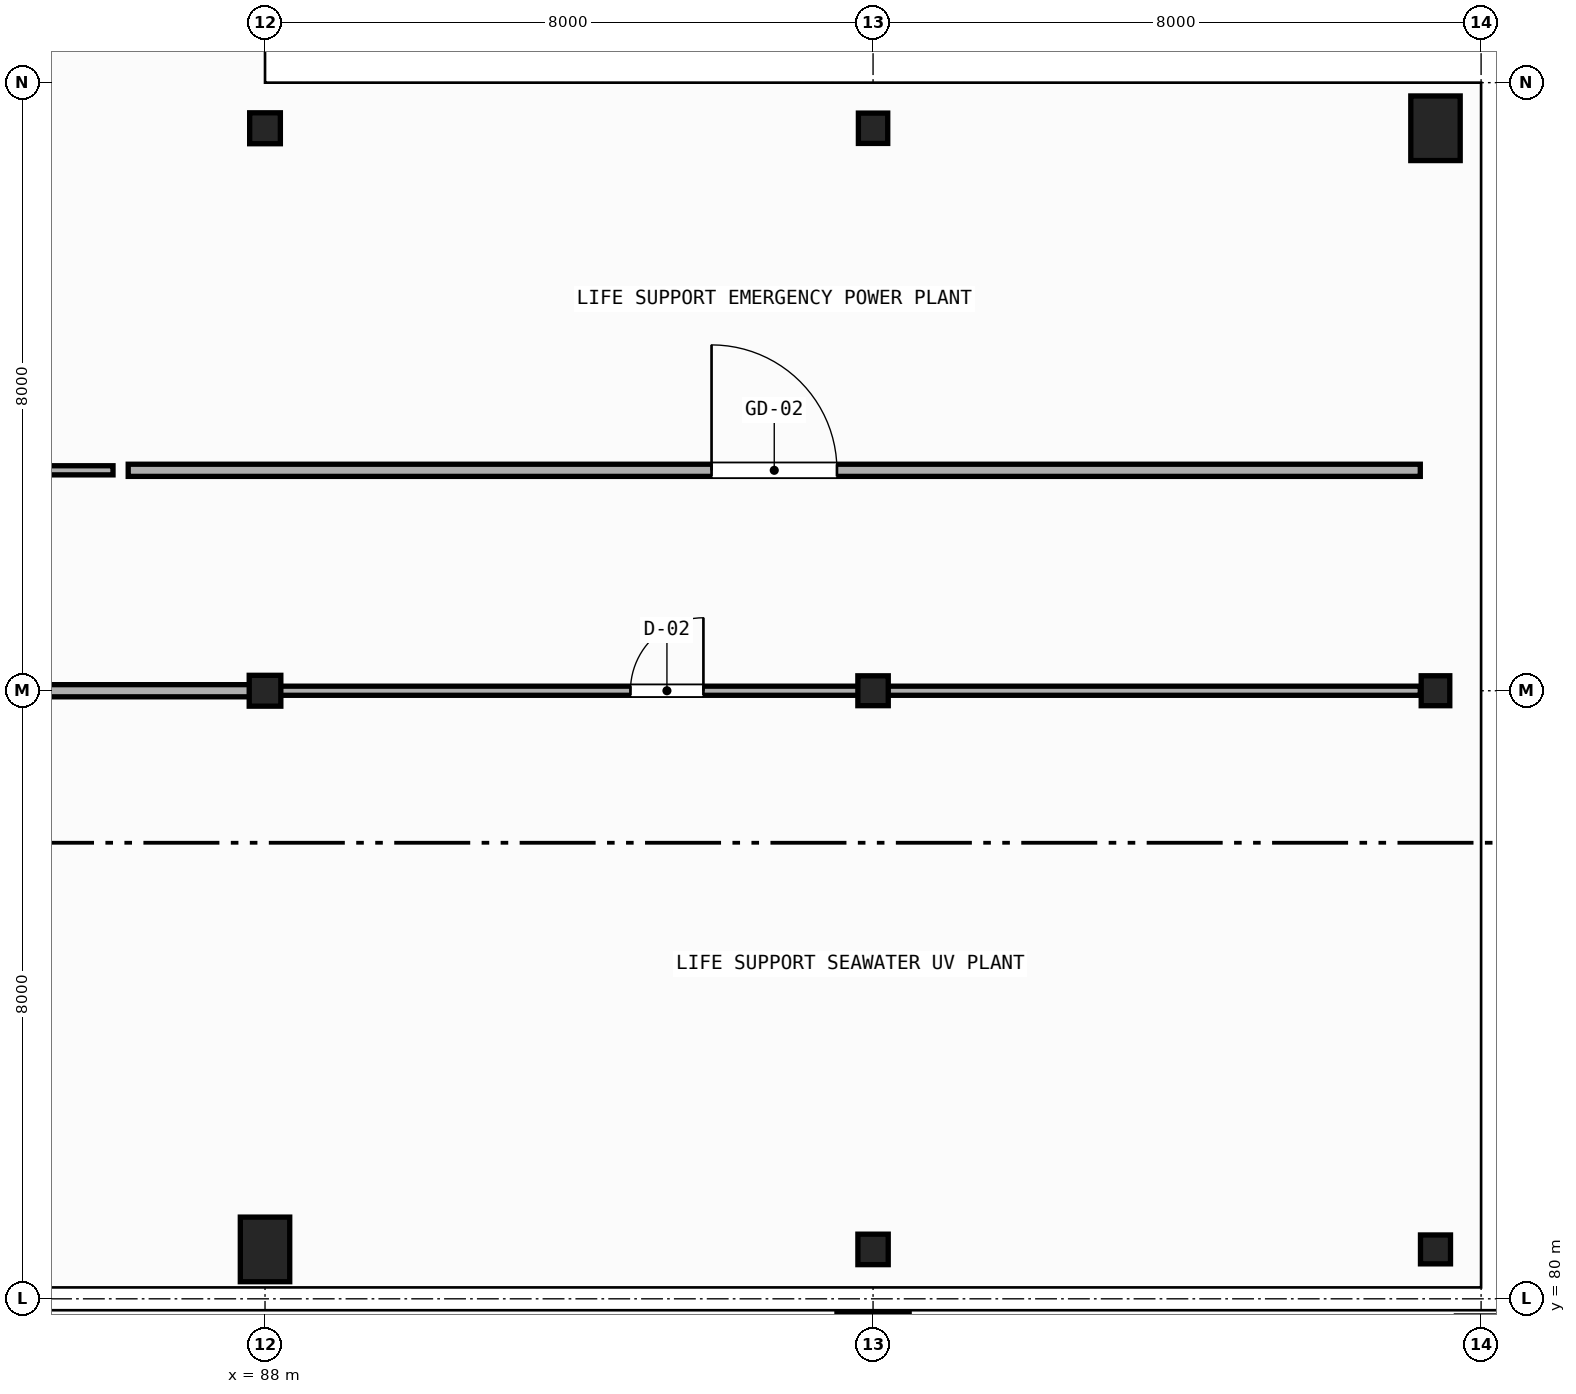
"""IFC4 building model, lengths in metres.
Left out: names, types, materials, properties, quantities, classifications, styles, units other than length and angle.
Written with IfcOpenShell. Run it as: python <this file> out.ifc"""

import sys

from ifc_helpers import new_model, si_unit, direction, frame, frame_2d, origin, origin_2d, place, context, subcontext, project, spatial, rectangle, i_section, extrude, element, fill, save


model = new_model("IFC4")
c1 = context("Model", 3, precision=1e-05, world=origin(), true_north=direction((0.0, 1.0)))
c2 = subcontext(c1, "Body", "Model", "MODEL_VIEW")
j1 = project(units=[si_unit("LENGTHUNIT", "METRE"), si_unit("PLANEANGLEUNIT", "RADIAN")], contexts=[c1])
p1 = place(None, origin())
s1 = spatial("IfcSite", under=j1, at=p1, CompositionType="ELEMENT")
p2 = place(p1, origin())
s2 = spatial("IfcBuilding", under=s1, at=p2, CompositionType="ELEMENT")
p3 = place(p2, origin())
s3 = spatial("IfcBuildingStorey", under=s2, at=p3, CompositionType="ELEMENT", Elevation=0.0)
p4 = place(p3, frame((96.0, 79.35, 0.0), z_axis=(0.0, 0.0, 1.0), x_axis=(0.0, 1.0, 0.0)))
e1 = element("IfcColumn", 1, at=p4, inside=s3, PredefinedType="COLUMN", context=c2, shape_type="SweptSolid", body=[
    extrude(rectangle(XDim=0.95, YDim=0.95, at=origin_2d()), origin(), (0.0, 0.0, 1.0), 5.08),
])
p5 = place(p3, frame((88.0, 80.65, 0.0), z_axis=(0.0, 0.0, 1.0), x_axis=(1.0, 0.0, 0.0)))
e2 = element("IfcColumn", 2, at=p5, inside=s3, PredefinedType="PILASTER", context=c2, shape_type="SweptSolid", body=[
    extrude(rectangle(XDim=0.65, YDim=0.85, at=origin_2d()), origin(), (0.0, 0.0, 1.0), 5.08),
])
p6 = place(p3, frame((88.0, 88.0, 0.0), z_axis=(0.0, 0.0, 1.0), x_axis=(0.0, 1.0, 0.0)))
e3 = element("IfcColumn", 3, at=p6, inside=s3, PredefinedType="COLUMN", context=c2, shape_type="SweptSolid", body=[
    extrude(i_section(OverallWidth=0.406, OverallDepth=0.416, WebThickness=0.03, FlangeThickness=0.048, FilletRadius=0.015, at=origin_2d()), origin(), (0.0, 0.0, 1.0), 5.08),
])
p7 = place(p3, frame((88.0, 95.4, 0.0), z_axis=(0.0, 0.0, 1.0), x_axis=(1.0, 0.0, 0.0)))
e4 = element("IfcColumn", 4, at=p7, inside=s3, PredefinedType="COLUMN", context=c2, shape_type="SweptSolid", body=[
    extrude(i_section(OverallWidth=0.404, OverallDepth=0.407, WebThickness=0.027, FlangeThickness=0.044, FilletRadius=0.015, at=origin_2d()), origin(), (0.0, 0.0, 1.0), 5.08),
])
p8 = place(p3, frame((96.0, 80.65, 0.0), z_axis=(0.0, 0.0, 1.0), x_axis=(0.0, 1.0, 0.0)))
e5 = element("IfcColumn", 5, at=p8, inside=s3, PredefinedType="COLUMN", context=c2, shape_type="SweptSolid", body=[
    extrude(i_section(OverallWidth=0.401, OverallDepth=0.399, WebThickness=0.025, FlangeThickness=0.04, FilletRadius=0.015, at=origin_2d()), origin(), (0.0, 0.0, 1.0), 5.08),
])
p9 = place(p3, frame((96.0, 88.0, 0.0), z_axis=(0.0, 0.0, 1.0), x_axis=(1.0, 0.0, 0.0)))
e6 = element("IfcColumn", 6, at=p9, inside=s3, PredefinedType="COLUMN", context=c2, shape_type="SweptSolid", body=[
    extrude(i_section(OverallWidth=0.4, OverallDepth=0.393, WebThickness=0.023, FlangeThickness=0.037, FilletRadius=0.015, at=origin_2d()), origin(), (0.0, 0.0, 1.0), 5.08),
])
p10 = place(p3, frame((96.0, 95.4, 0.0), z_axis=(0.0, 0.0, 1.0), x_axis=(0.0, 1.0, 0.0)))
e7 = element("IfcColumn", 7, at=p10, inside=s3, PredefinedType="COLUMN", context=c2, shape_type="SweptSolid", body=[
    extrude(i_section(OverallWidth=0.399, OverallDepth=0.386, WebThickness=0.021, FlangeThickness=0.033, FilletRadius=0.015, at=origin_2d()), origin(), (0.0, 0.0, 1.0), 5.08),
])
p11 = place(p3, frame((103.4, 80.65, 0.0), z_axis=(0.0, 0.0, 1.0), x_axis=(1.0, 0.0, 0.0)))
e8 = element("IfcColumn", 8, at=p11, inside=s3, PredefinedType="COLUMN", context=c2, shape_type="SweptSolid", body=[
    extrude(i_section(OverallWidth=0.395, OverallDepth=0.38, WebThickness=0.019, FlangeThickness=0.03, FilletRadius=0.015, at=origin_2d()), origin(), (0.0, 0.0, 1.0), 5.08),
])
p12 = place(p3, frame((103.4, 88.0, 0.0), z_axis=(0.0, 0.0, 1.0), x_axis=(0.0, 1.0, 0.0)))
e9 = element("IfcColumn", 9, at=p12, inside=s3, PredefinedType="COLUMN", context=c2, shape_type="SweptSolid", body=[
    extrude(i_section(OverallWidth=0.394, OverallDepth=0.376, WebThickness=0.017, FlangeThickness=0.028, FilletRadius=0.015, at=origin_2d()), origin(), (0.0, 0.0, 1.0), 5.08),
])
p13 = place(p3, frame((103.4, 95.4, 0.0), z_axis=(0.0, 0.0, 1.0), x_axis=(1.0, 0.0, 0.0)))
e10 = element("IfcColumn", 10, at=p13, inside=s3, PredefinedType="PILASTER", context=c2, shape_type="SweptSolid", body=[
    extrude(rectangle(XDim=0.65, YDim=0.85, at=origin_2d()), origin(), (0.0, 0.0, 1.0), 5.08),
])
p14 = place(p3, frame((70.4, 88.0, 0.0), z_axis=(0.0, 0.0, 1.0), x_axis=(1.0, 0.0, 0.0)))
e11 = element("IfcWall", 11, at=p14, inside=s3, PredefinedType="PARTITIONING", context=c2, shape_type="SweptSolid", body=[
    extrude(rectangle(XDim=17.6, YDim=0.16, at=frame_2d((8.8, 0.0))), origin(), (0.0, 0.0, 1.0), 4.278),
])
p15 = place(p14, frame((5.421, 0.0, 0.0)))
e12 = element("IfcOpeningElement", 12, at=p15, cuts=e11, PredefinedType="OPENING", context=c2, shape_type="SweptSolid", body=[
    extrude(rectangle(XDim=1.02, YDim=2.15, at=frame_2d((0.51, 1.075))), frame((0.0, 0.09, 0.0), z_axis=(0.0, -1.0, 0.0), x_axis=(1.0, 0.0, 0.0)), (0.0, 0.0, 1.0), 0.18),
])
p16 = place(p3, frame((88.2, 88.0, 0.0), z_axis=(0.0, 0.0, 1.0), x_axis=(1.0, 0.0, 0.0)))
e13 = element("IfcWall", 13, at=p16, inside=s3, PredefinedType="PARTITIONING", context=c2, shape_type="SweptSolid", body=[
    extrude(rectangle(XDim=15.0, YDim=0.12, at=frame_2d((7.5, 0.0))), origin(), (0.0, 0.0, 1.0), 4.278),
])
p17 = place(p16, frame((4.608, 0.0, 0.0)))
e14 = element("IfcOpeningElement", 14, at=p17, cuts=e13, PredefinedType="OPENING", context=c2, shape_type="SweptSolid", body=[
    extrude(rectangle(XDim=0.96, YDim=2.1, at=frame_2d((0.48, 1.05))), frame((0.0, 0.07, 0.0), z_axis=(0.0, -1.0, 0.0), x_axis=(1.0, 0.0, 0.0)), (0.0, 0.0, 1.0), 0.14),
])
p18 = place(p3, frame((71.8, 90.9, 0.0), z_axis=(0.0, 0.0, 1.0), x_axis=(1.0, 0.0, 0.0)))
e15 = element("IfcWall", 15, at=p18, inside=s3, PredefinedType="PARTITIONING", context=c2, shape_type="SweptSolid", body=[
    extrude(rectangle(XDim=14.2, YDim=0.12, at=frame_2d((7.1, 0.0))), origin(), (0.0, 0.0, 1.0), 4.278),
])
p19 = place(p18, frame((6.2, 0.0, 0.0)))
e16 = element("IfcOpeningElement", 16, at=p19, cuts=e15, PredefinedType="OPENING", context=c2, shape_type="SweptSolid", body=[
    extrude(rectangle(XDim=1.8, YDim=2.4, at=frame_2d((0.9, 1.2))), frame((0.0, 0.07, 0.0), z_axis=(0.0, -1.0, 0.0), x_axis=(1.0, 0.0, 0.0)), (0.0, 0.0, 1.0), 0.14),
])
p20 = place(p3, frame((86.2, 90.9, 0.0), z_axis=(0.0, 0.0, 1.0), x_axis=(1.0, 0.0, 0.0)))
e17 = element("IfcWall", 17, at=p20, inside=s3, PredefinedType="PARTITIONING", context=c2, shape_type="SweptSolid", body=[
    extrude(rectangle(XDim=17.0, YDim=0.16, at=frame_2d((8.5, 0.0))), origin(), (0.0, 0.0, 1.0), 4.287),
])
p21 = place(p20, frame((7.675, 0.0, 0.0)))
e18 = element("IfcOpeningElement", 18, at=p21, cuts=e17, PredefinedType="OPENING", context=c2, shape_type="SweptSolid", body=[
    extrude(rectangle(XDim=1.65, YDim=2.35, at=frame_2d((0.825, 1.175))), frame((0.0, 0.09, 0.0), z_axis=(0.0, -1.0, 0.0), x_axis=(1.0, 0.0, 0.0)), (0.0, 0.0, 1.0), 0.18),
])
p22 = place(p17, origin())
e19 = element("IfcDoor", 19, at=p22, inside=s3, OperationType="SINGLE_SWING_RIGHT", PredefinedType="DOOR", context=c2, shape_type="SweptSolid", body=[
    extrude(rectangle(XDim=0.96, YDim=2.1, at=frame_2d((0.48, 1.05))), frame((0.0, 0.025, 0.0), z_axis=(0.0, -1.0, 0.0), x_axis=(1.0, 0.0, 0.0)), (0.0, 0.0, 1.0), 0.05),
])
fill(e14, e19)
p23 = place(p21, origin())
e20 = element("IfcDoor", 20, at=p23, inside=s3, OperationType="SINGLE_SWING_LEFT", PredefinedType="DOOR", context=c2, shape_type="SweptSolid", body=[
    extrude(rectangle(XDim=1.65, YDim=2.35, at=frame_2d((0.825, 1.175))), frame((0.0, 0.025, 0.0), z_axis=(0.0, -1.0, 0.0), x_axis=(1.0, 0.0, 0.0)), (0.0, 0.0, 1.0), 0.05),
])
fill(e18, e20)
save(model, sys.argv[1])
